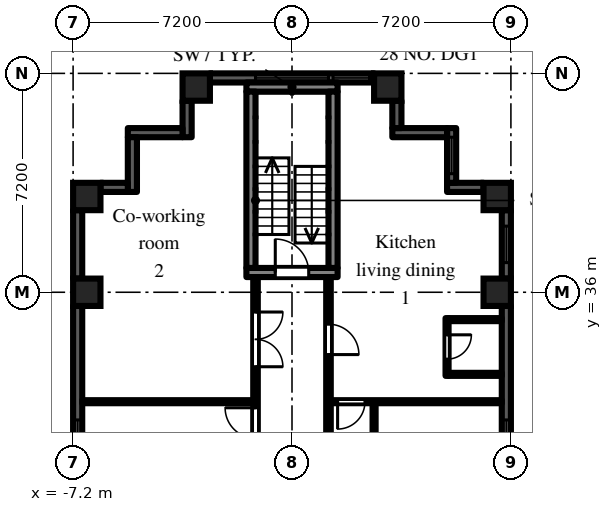
"""IFC4 building model, lengths in metres.
Left out: names, types, materials, properties, quantities, classifications, styles, units other than length and angle.
Written with IfcOpenShell. Run it as: python <this file> out.ifc"""

import sys

from ifc_helpers import new_model, si_unit, direction, frame, frame_2d, origin, origin_2d, place, context, subcontext, project, spatial, rectangle, extrude, element, fill, save


model = new_model("IFC4")
c1 = context("Model", 3, precision=1e-05, world=origin(), true_north=direction((0.0, 1.0)))
c2 = subcontext(c1, "Body", "Model", "MODEL_VIEW")
j1 = project(units=[si_unit("LENGTHUNIT", "METRE"), si_unit("PLANEANGLEUNIT", "RADIAN")], contexts=[c1])
p1 = place(None, origin())
s1 = spatial("IfcSite", under=j1, at=p1, CompositionType="ELEMENT")
p2 = place(p1, origin())
s2 = spatial("IfcBuilding", under=s1, at=p2, CompositionType="ELEMENT")
p3 = place(p2, frame((0.0, 0.0, 44.7)))
s3 = spatial("IfcBuildingStorey", under=s2, at=p3, CompositionType="ELEMENT", Elevation=44.7)
for number, where, z_axis, x_axis in (
    (1, (-6.75, 36.0, 0.0), (0.0, 0.0, 1.0), (1.0, 0.0, 0.0)),
    (2, (-6.75, 39.15, 0.0), (0.0, 0.0, 1.0), (1.0, 0.0, 0.0)),
    (3, (-3.15, 42.75, 0.0), (0.0, 0.0, 1.0), (1.0, 0.0, 0.0)),
    (4, (3.15, 42.75, 0.0), (0.0, 0.0, 1.0), (1.0, 0.0, 0.0)),
    (5, (6.75, 36.0, 0.0), (0.0, 0.0, 1.0), (1.0, 0.0, 0.0)),
    (6, (6.75, 39.15, 0.0), (0.0, 0.0, 1.0), (1.0, 0.0, 0.0)),
):
    element("IfcColumn", number, at=place(p3, frame(where, z_axis=z_axis, x_axis=x_axis)), inside=s3, PredefinedType="COLUMN", context=c2, shape_type="SweptSolid", body=[
        extrude(rectangle(XDim=0.9, YDim=0.9, at=origin_2d()), origin(), (0.0, 0.0, 1.0), 3.0),
    ])
p4 = place(p3, frame((7.05, 29.25, 0.0), z_axis=(0.0, 0.0, 1.0), x_axis=(0.0, 1.0, 0.0)))
e7 = element("IfcWall", 7, at=p4, inside=s3, PredefinedType="SOLIDWALL", context=c2, shape_type="SweptSolid", body=[
    extrude(rectangle(XDim=6.3, YDim=0.3, at=frame_2d((3.15, 0.0))), origin(), (0.0, 0.0, 1.0), 2.1),
])
p5 = place(p4, frame((0.15, 0.0, 0.2)))
e8 = element("IfcOpeningElement", 8, at=p5, cuts=e7, PredefinedType="OPENING", context=c2, shape_type="SweptSolid", body=[
    extrude(rectangle(XDim=2.4, YDim=1.85, at=frame_2d((1.2, 0.925))), frame((0.0, 0.16, 0.0), z_axis=(0.0, -1.0, 0.0), x_axis=(1.0, 0.0, 0.0)), (0.0, 0.0, 1.0), 0.32),
])
p6 = place(p3, frame((7.05, 36.45, 0.0), z_axis=(0.0, 0.0, 1.0), x_axis=(0.0, 1.0, 0.0)))
e9 = element("IfcWall", 9, at=p6, inside=s3, PredefinedType="SOLIDWALL", context=c2, shape_type="SweptSolid", body=[
    extrude(rectangle(XDim=2.25, YDim=0.3, at=frame_2d((1.125, 0.0))), origin(), (0.0, 0.0, 1.0), 2.1),
])
p7 = place(p6, frame((0.525, 0.0, 0.2)))
e10 = element("IfcOpeningElement", 10, at=p7, cuts=e9, PredefinedType="OPENING", context=c2, shape_type="SweptSolid", body=[
    extrude(rectangle(XDim=1.2, YDim=1.85, at=frame_2d((0.6, 0.925))), frame((0.0, 0.16, 0.0), z_axis=(0.0, -1.0, 0.0), x_axis=(1.0, 0.0, 0.0)), (0.0, 0.0, 1.0), 0.32),
])
p8 = place(p3, frame((6.3, 39.45, 0.0), z_axis=(0.0, 0.0, 1.0), x_axis=(-1.0, 0.0, 0.0)))
e11 = element("IfcWall", 11, at=p8, inside=s3, PredefinedType="SOLIDWALL", context=c2, shape_type="SweptSolid", body=[
    extrude(rectangle(XDim=1.2, YDim=0.3, at=frame_2d((0.6, 0.0))), origin(), (0.0, 0.0, 1.0), 2.575),
])
p9 = place(p3, frame((5.25, 39.6, 0.0), z_axis=(0.0, 0.0, 1.0), x_axis=(0.0, 1.0, 0.0)))
e12 = element("IfcWall", 12, at=p9, inside=s3, PredefinedType="SOLIDWALL", context=c2, shape_type="SweptSolid", body=[
    extrude(rectangle(XDim=1.8, YDim=0.3, at=frame_2d((0.9, 0.0))), origin(), (0.0, 0.0, 1.0), 2.575),
])
p10 = place(p9, frame((0.3, 0.0, 0.2)))
e13 = element("IfcOpeningElement", 13, at=p10, cuts=e12, PredefinedType="OPENING", context=c2, shape_type="SweptSolid", body=[
    extrude(rectangle(XDim=1.2, YDim=1.85, at=frame_2d((0.6, 0.925))), frame((0.0, 0.16, 0.0), z_axis=(0.0, -1.0, 0.0), x_axis=(1.0, 0.0, 0.0)), (0.0, 0.0, 1.0), 0.32),
])
p11 = place(p3, frame((5.1, 41.25, 0.0), z_axis=(0.0, 0.0, 1.0), x_axis=(-1.0, 0.0, 0.0)))
e14 = element("IfcWall", 14, at=p11, inside=s3, PredefinedType="SOLIDWALL", context=c2, shape_type="SweptSolid", body=[
    extrude(rectangle(XDim=1.8, YDim=0.3, at=frame_2d((0.9, 0.0))), origin(), (0.0, 0.0, 1.0), 2.575),
])
p12 = place(p3, frame((3.45, 41.4, 0.0), z_axis=(0.0, 0.0, 1.0), x_axis=(0.0, 1.0, 0.0)))
e15 = element("IfcWall", 15, at=p12, inside=s3, PredefinedType="SOLIDWALL", context=c2, shape_type="SweptSolid", body=[
    extrude(rectangle(XDim=0.9, YDim=0.3, at=frame_2d((0.45, 0.0))), origin(), (0.0, 0.0, 1.0), 2.575),
])
p13 = place(p3, frame((2.7, 43.05, 0.0), z_axis=(0.0, 0.0, 1.0), x_axis=(-1.0, 0.0, 0.0)))
e16 = element("IfcWall", 16, at=p13, inside=s3, PredefinedType="SOLIDWALL", context=c2, shape_type="SweptSolid", body=[
    extrude(rectangle(XDim=5.4, YDim=0.3, at=frame_2d((2.7, 0.0))), origin(), (0.0, 0.0, 1.0), 2.1),
])
p14 = place(p13, frame((1.5, 0.0, 0.2)))
e17 = element("IfcOpeningElement", 17, at=p14, cuts=e16, PredefinedType="OPENING", context=c2, shape_type="SweptSolid", body=[
    extrude(rectangle(XDim=2.4, YDim=1.85, at=frame_2d((1.2, 0.925))), frame((0.0, 0.16, 0.0), z_axis=(0.0, -1.0, 0.0), x_axis=(1.0, 0.0, 0.0)), (0.0, 0.0, 1.0), 0.32),
])
p15 = place(p13, frame((0.15, 0.0, 0.2)))
e18 = element("IfcOpeningElement", 18, at=p15, cuts=e16, PredefinedType="OPENING", context=c2, shape_type="SweptSolid", body=[
    extrude(rectangle(XDim=1.2, YDim=1.85, at=frame_2d((0.6, 0.925))), frame((0.0, 0.16, 0.0), z_axis=(0.0, -1.0, 0.0), x_axis=(1.0, 0.0, 0.0)), (0.0, 0.0, 1.0), 0.32),
])
p16 = place(p3, frame((-3.45, 42.3, 0.0), z_axis=(0.0, 0.0, 1.0), x_axis=(0.0, -1.0, 0.0)))
e19 = element("IfcWall", 19, at=p16, inside=s3, PredefinedType="SOLIDWALL", context=c2, shape_type="SweptSolid", body=[
    extrude(rectangle(XDim=1.2, YDim=0.3, at=frame_2d((0.6, 0.0))), origin(), (0.0, 0.0, 1.0), 2.575),
])
p17 = place(p3, frame((-3.6, 41.25, 0.0), z_axis=(0.0, 0.0, 1.0), x_axis=(-1.0, 0.0, 0.0)))
e20 = element("IfcWall", 20, at=p17, inside=s3, PredefinedType="SOLIDWALL", context=c2, shape_type="SweptSolid", body=[
    extrude(rectangle(XDim=1.8, YDim=0.3, at=frame_2d((0.9, 0.0))), origin(), (0.0, 0.0, 1.0), 2.575),
])
p18 = place(p3, frame((-5.25, 41.1, 0.0), z_axis=(0.0, 0.0, 1.0), x_axis=(0.0, -1.0, 0.0)))
e21 = element("IfcWall", 21, at=p18, inside=s3, PredefinedType="SOLIDWALL", context=c2, shape_type="SweptSolid", body=[
    extrude(rectangle(XDim=1.8, YDim=0.3, at=frame_2d((0.9, 0.0))), origin(), (0.0, 0.0, 1.0), 2.575),
])
p19 = place(p3, frame((-5.4, 39.45, 0.0), z_axis=(0.0, 0.0, 1.0), x_axis=(-1.0, 0.0, 0.0)))
e22 = element("IfcWall", 22, at=p19, inside=s3, PredefinedType="SOLIDWALL", context=c2, shape_type="SweptSolid", body=[
    extrude(rectangle(XDim=0.9, YDim=0.3, at=frame_2d((0.45, 0.0))), origin(), (0.0, 0.0, 1.0), 2.575),
])
p20 = place(p3, frame((-7.05, 38.7, 0.0), z_axis=(0.0, 0.0, 1.0), x_axis=(0.0, -1.0, 0.0)))
e23 = element("IfcWall", 23, at=p20, inside=s3, PredefinedType="SOLIDWALL", context=c2, shape_type="SweptSolid", body=[
    extrude(rectangle(XDim=2.25, YDim=0.3, at=frame_2d((1.125, 0.0))), origin(), (0.0, 0.0, 1.0), 2.1),
])
p21 = place(p3, frame((-7.05, 35.55, 0.0), z_axis=(0.0, 0.0, 1.0), x_axis=(0.0, -1.0, 0.0)))
e24 = element("IfcWall", 24, at=p21, inside=s3, PredefinedType="SOLIDWALL", context=c2, shape_type="SweptSolid", body=[
    extrude(rectangle(XDim=6.3, YDim=0.3, at=frame_2d((3.15, 0.0))), origin(), (0.0, 0.0, 1.0), 2.1),
])
p22 = place(p21, frame((3.75, 0.0, 0.2)))
e25 = element("IfcOpeningElement", 25, at=p22, cuts=e24, PredefinedType="OPENING", context=c2, shape_type="SweptSolid", body=[
    extrude(rectangle(XDim=2.4, YDim=1.85, at=frame_2d((1.2, 0.925))), frame((0.0, 0.16, 0.0), z_axis=(0.0, -1.0, 0.0), x_axis=(1.0, 0.0, 0.0)), (0.0, 0.0, 1.0), 0.32),
])
p23 = place(p3, frame((-1.5, 36.65, 0.0), z_axis=(0.0, 0.0, 1.0), x_axis=(1.0, 0.0, 0.0)))
e26 = element("IfcWall", 26, at=p23, inside=s3, PredefinedType="SHEAR", context=c2, shape_type="SweptSolid", body=[
    extrude(rectangle(XDim=3.0, YDim=0.3, at=frame_2d((1.5, 0.0))), origin(), (0.0, 0.0, 1.0), 2.575),
])
p24 = place(p23, frame((0.95, 0.0, 0.0)))
e27 = element("IfcOpeningElement", 27, at=p24, cuts=e26, PredefinedType="OPENING", context=c2, shape_type="SweptSolid", body=[
    extrude(rectangle(XDim=1.1, YDim=2.1, at=frame_2d((0.55, 1.05))), frame((0.0, 0.16, 0.0), z_axis=(0.0, -1.0, 0.0), x_axis=(1.0, 0.0, 0.0)), (0.0, 0.0, 1.0), 0.32),
])
p25 = place(p3, frame((-1.5, 42.75, 0.0), z_axis=(0.0, 0.0, 1.0), x_axis=(1.0, 0.0, 0.0)))
e28 = element("IfcWall", 28, at=p25, inside=s3, PredefinedType="SHEAR", context=c2, shape_type="SweptSolid", body=[
    extrude(rectangle(XDim=3.0, YDim=0.3, at=frame_2d((1.5, 0.0))), origin(), (0.0, 0.0, 1.0), 2.575),
])
for number, where, z_axis, x_axis in (
    (29, (-1.35, 36.8, 0.0), (0.0, 0.0, 1.0), (0.0, 1.0, 0.0)),
    (30, (1.35, 36.8, 0.0), (0.0, 0.0, 1.0), (0.0, 1.0, 0.0)),
):
    element("IfcWall", number, at=place(p3, frame(where, z_axis=z_axis, x_axis=x_axis)), inside=s3, PredefinedType="SHEAR", context=c2, shape_type="SweptSolid", body=[
        extrude(rectangle(XDim=5.8, YDim=0.3, at=frame_2d((2.9, 0.0))), origin(), (0.0, 0.0, 1.0), 2.575),
    ])
p26 = place(p3, frame((-6.9, 32.4, 0.0), z_axis=(0.0, 0.0, 1.0), x_axis=(1.0, 0.0, 0.0)))
e31 = element("IfcWall", 31, at=p26, inside=s3, PredefinedType="PARTITIONING", context=c2, shape_type="SweptSolid", body=[
    extrude(rectangle(XDim=5.625, YDim=0.1, at=frame_2d((2.812, 0.0))), origin(), (0.0, 0.0, 1.0), 2.575),
])
p27 = place(p3, frame((-1.2, 1.275, 0.0), z_axis=(0.0, 0.0, 1.0), x_axis=(0.0, 1.0, 0.0)))
e32 = element("IfcWall", 32, at=p27, inside=s3, PredefinedType="PARTITIONING", context=c2, shape_type="SweptSolid", body=[
    extrude(rectangle(XDim=35.225, YDim=0.15, at=frame_2d((17.613, 0.0))), origin(), (0.0, 0.0, 1.0), 2.575),
])
p28 = place(p27, frame((2.475, 0.0, 0.0)))
e33 = element("IfcOpeningElement", 33, at=p28, cuts=e32, PredefinedType="OPENING", context=c2, shape_type="SweptSolid", body=[
    extrude(rectangle(XDim=0.9, YDim=2.1, at=frame_2d((0.45, 1.05))), frame((0.0, 0.085, 0.0), z_axis=(0.0, -1.0, 0.0), x_axis=(1.0, 0.0, 0.0)), (0.0, 0.0, 1.0), 0.17),
])
p29 = place(p27, frame((10.875, 0.0, 0.0)))
e34 = element("IfcOpeningElement", 34, at=p29, cuts=e32, PredefinedType="OPENING", context=c2, shape_type="SweptSolid", body=[
    extrude(rectangle(XDim=0.9, YDim=2.1, at=frame_2d((0.45, 1.05))), frame((0.0, 0.085, 0.0), z_axis=(0.0, -1.0, 0.0), x_axis=(1.0, 0.0, 0.0)), (0.0, 0.0, 1.0), 0.17),
])
p30 = place(p27, frame((15.825, 0.0, 0.0)))
e35 = element("IfcOpeningElement", 35, at=p30, cuts=e32, PredefinedType="OPENING", context=c2, shape_type="SweptSolid", body=[
    extrude(rectangle(XDim=1.8, YDim=2.1, at=frame_2d((0.9, 1.05))), frame((0.0, 0.085, 0.0), z_axis=(0.0, -1.0, 0.0), x_axis=(1.0, 0.0, 0.0)), (0.0, 0.0, 1.0), 0.17),
])
p31 = place(p27, frame((22.725, 0.0, 0.0)))
e36 = element("IfcOpeningElement", 36, at=p31, cuts=e32, PredefinedType="OPENING", context=c2, shape_type="SweptSolid", body=[
    extrude(rectangle(XDim=1.0, YDim=2.1, at=frame_2d((0.5, 1.05))), frame((0.0, 0.085, 0.0), z_axis=(0.0, -1.0, 0.0), x_axis=(1.0, 0.0, 0.0)), (0.0, 0.0, 1.0), 0.17),
])
p32 = place(p27, frame((29.925, 0.0, 0.0)))
e37 = element("IfcOpeningElement", 37, at=p32, cuts=e32, PredefinedType="OPENING", context=c2, shape_type="SweptSolid", body=[
    extrude(rectangle(XDim=1.0, YDim=2.1, at=frame_2d((0.5, 1.05))), frame((0.0, 0.085, 0.0), z_axis=(0.0, -1.0, 0.0), x_axis=(1.0, 0.0, 0.0)), (0.0, 0.0, 1.0), 0.17),
])
p33 = place(p27, frame((32.275, 0.0, 0.0)))
e38 = element("IfcOpeningElement", 38, at=p33, cuts=e32, PredefinedType="OPENING", context=c2, shape_type="SweptSolid", body=[
    extrude(rectangle(XDim=1.8, YDim=2.1, at=frame_2d((0.9, 1.05))), frame((0.0, 0.085, 0.0), z_axis=(0.0, -1.0, 0.0), x_axis=(1.0, 0.0, 0.0)), (0.0, 0.0, 1.0), 0.17),
])
p34 = place(p3, frame((1.2, 1.125, 0.0), z_axis=(0.0, 0.0, 1.0), x_axis=(0.0, 1.0, 0.0)))
e39 = element("IfcWall", 39, at=p34, inside=s3, PredefinedType="PARTITIONING", context=c2, shape_type="SweptSolid", body=[
    extrude(rectangle(XDim=35.375, YDim=0.15, at=frame_2d((17.688, 0.0))), origin(), (0.0, 0.0, 1.0), 2.575),
])
p35 = place(p34, frame((3.825, 0.0, 0.0)))
e40 = element("IfcOpeningElement", 40, at=p35, cuts=e39, PredefinedType="OPENING", context=c2, shape_type="SweptSolid", body=[
    extrude(rectangle(XDim=0.9, YDim=2.1, at=frame_2d((0.45, 1.05))), frame((0.0, 0.085, 0.0), z_axis=(0.0, -1.0, 0.0), x_axis=(1.0, 0.0, 0.0)), (0.0, 0.0, 1.0), 0.17),
])
p36 = place(p34, frame((7.425, 0.0, 0.0)))
e41 = element("IfcOpeningElement", 41, at=p36, cuts=e39, PredefinedType="OPENING", context=c2, shape_type="SweptSolid", body=[
    extrude(rectangle(XDim=0.9, YDim=2.1, at=frame_2d((0.45, 1.05))), frame((0.0, 0.085, 0.0), z_axis=(0.0, -1.0, 0.0), x_axis=(1.0, 0.0, 0.0)), (0.0, 0.0, 1.0), 0.17),
])
p37 = place(p34, frame((13.725, 0.0, 0.0)))
e42 = element("IfcOpeningElement", 42, at=p37, cuts=e39, PredefinedType="OPENING", context=c2, shape_type="SweptSolid", body=[
    extrude(rectangle(XDim=0.9, YDim=2.1, at=frame_2d((0.45, 1.05))), frame((0.0, 0.085, 0.0), z_axis=(0.0, -1.0, 0.0), x_axis=(1.0, 0.0, 0.0)), (0.0, 0.0, 1.0), 0.17),
])
p38 = place(p34, frame((15.525, 0.0, 0.0)))
e43 = element("IfcOpeningElement", 43, at=p38, cuts=e39, PredefinedType="OPENING", context=c2, shape_type="SweptSolid", body=[
    extrude(rectangle(XDim=0.9, YDim=2.1, at=frame_2d((0.45, 1.05))), frame((0.0, 0.085, 0.0), z_axis=(0.0, -1.0, 0.0), x_axis=(1.0, 0.0, 0.0)), (0.0, 0.0, 1.0), 0.17),
])
p39 = place(p34, frame((32.825, 0.0, 0.0)))
e44 = element("IfcOpeningElement", 44, at=p39, cuts=e39, PredefinedType="OPENING", context=c2, shape_type="SweptSolid", body=[
    extrude(rectangle(XDim=1.0, YDim=2.1, at=frame_2d((0.5, 1.05))), frame((0.0, 0.085, 0.0), z_axis=(0.0, -1.0, 0.0), x_axis=(1.0, 0.0, 0.0)), (0.0, 0.0, 1.0), 0.17),
])
p40 = place(p3, frame((1.275, 32.4, 0.0), z_axis=(0.0, 0.0, 1.0), x_axis=(1.0, 0.0, 0.0)))
e45 = element("IfcWall", 45, at=p40, inside=s3, PredefinedType="PARTITIONING", context=c2, shape_type="SweptSolid", body=[
    extrude(rectangle(XDim=5.625, YDim=0.1, at=frame_2d((2.812, 0.0))), origin(), (0.0, 0.0, 1.0), 2.575),
])
p41 = place(p40, frame((0.225, 0.0, 0.0)))
e46 = element("IfcOpeningElement", 46, at=p41, cuts=e45, PredefinedType="OPENING", context=c2, shape_type="SweptSolid", body=[
    extrude(rectangle(XDim=0.9, YDim=2.1, at=frame_2d((0.45, 1.05))), frame((0.0, 0.06, 0.0), z_axis=(0.0, -1.0, 0.0), x_axis=(1.0, 0.0, 0.0)), (0.0, 0.0, 1.0), 0.12),
])
p42 = place(p3, frame((2.7, 18.075, 0.0), z_axis=(0.0, 0.0, 1.0), x_axis=(0.0, 1.0, 0.0)))
e47 = element("IfcWall", 47, at=p42, inside=s3, PredefinedType="PARTITIONING", context=c2, shape_type="SweptSolid", body=[
    extrude(rectangle(XDim=14.275, YDim=0.1, at=frame_2d((7.138, 0.0))), origin(), (0.0, 0.0, 1.0), 2.575),
])
p43 = place(p42, frame((3.255, 0.0, 0.0)))
e48 = element("IfcOpeningElement", 48, at=p43, cuts=e47, PredefinedType="OPENING", context=c2, shape_type="SweptSolid", body=[
    extrude(rectangle(XDim=0.9, YDim=2.1, at=frame_2d((0.45, 1.05))), frame((0.0, 0.06, 0.0), z_axis=(0.0, -1.0, 0.0), x_axis=(1.0, 0.0, 0.0)), (0.0, 0.0, 1.0), 0.12),
])
p44 = place(p42, frame((10.095, 0.0, 0.0)))
e49 = element("IfcOpeningElement", 49, at=p44, cuts=e47, PredefinedType="OPENING", context=c2, shape_type="SweptSolid", body=[
    extrude(rectangle(XDim=0.9, YDim=2.1, at=frame_2d((0.45, 1.05))), frame((0.0, 0.06, 0.0), z_axis=(0.0, -1.0, 0.0), x_axis=(1.0, 0.0, 0.0)), (0.0, 0.0, 1.0), 0.12),
])
p45 = place(p3, frame((5.1, 33.25, 0.0), z_axis=(0.0, 0.0, 1.0), x_axis=(0.0, 1.0, 0.0)))
e50 = element("IfcWall", 50, at=p45, inside=s3, PredefinedType="PARTITIONING", context=c2, shape_type="SweptSolid", body=[
    extrude(rectangle(XDim=1.9, YDim=0.1, at=frame_2d((0.95, 0.0))), origin(), (0.0, 0.0, 1.0), 2.575),
])
p46 = place(p45, frame((0.55, 0.0, 0.0)))
e51 = element("IfcOpeningElement", 51, at=p46, cuts=e50, PredefinedType="OPENING", context=c2, shape_type="SweptSolid", body=[
    extrude(rectangle(XDim=0.8, YDim=2.1, at=frame_2d((0.4, 1.05))), frame((0.0, 0.06, 0.0), z_axis=(0.0, -1.0, 0.0), x_axis=(1.0, 0.0, 0.0)), (0.0, 0.0, 1.0), 0.12),
])
for number, where, z_axis, x_axis in (
    (52, (5.15, 33.3, 0.0), (0.0, 0.0, 1.0), (1.0, 0.0, 0.0)),
    (53, (5.15, 35.1, 0.0), (0.0, 0.0, 1.0), (1.0, 0.0, 0.0)),
):
    element("IfcWall", number, at=place(p3, frame(where, z_axis=z_axis, x_axis=x_axis)), inside=s3, PredefinedType="PARTITIONING", context=c2, shape_type="SweptSolid", body=[
        extrude(rectangle(XDim=1.75, YDim=0.1, at=frame_2d((0.875, 0.0))), origin(), (0.0, 0.0, 1.0), 2.575),
    ])
p47 = place(p5, origin())
e54 = element("IfcWindow", 54, at=p47, inside=s3, PartitioningType="SINGLE_PANEL", PredefinedType="WINDOW", context=c2, shape_type="SweptSolid", body=[
    extrude(rectangle(XDim=2.4, YDim=1.85, at=frame_2d((1.2, 0.925))), frame((0.0, 0.03, 0.0), z_axis=(0.0, -1.0, 0.0), x_axis=(1.0, 0.0, 0.0)), (0.0, 0.0, 1.0), 0.06),
])
fill(e8, e54)
p48 = place(p7, origin())
e55 = element("IfcWindow", 55, at=p48, inside=s3, PartitioningType="SINGLE_PANEL", PredefinedType="WINDOW", context=c2, shape_type="SweptSolid", body=[
    extrude(rectangle(XDim=1.2, YDim=1.85, at=frame_2d((0.6, 0.925))), frame((0.0, 0.03, 0.0), z_axis=(0.0, -1.0, 0.0), x_axis=(1.0, 0.0, 0.0)), (0.0, 0.0, 1.0), 0.06),
])
fill(e10, e55)
p49 = place(p10, origin())
e56 = element("IfcWindow", 56, at=p49, inside=s3, PartitioningType="SINGLE_PANEL", PredefinedType="WINDOW", context=c2, shape_type="SweptSolid", body=[
    extrude(rectangle(XDim=1.2, YDim=1.85, at=frame_2d((0.6, 0.925))), frame((0.0, 0.03, 0.0), z_axis=(0.0, -1.0, 0.0), x_axis=(1.0, 0.0, 0.0)), (0.0, 0.0, 1.0), 0.06),
])
fill(e13, e56)
p50 = place(p14, origin())
e57 = element("IfcWindow", 57, at=p50, inside=s3, PartitioningType="SINGLE_PANEL", PredefinedType="WINDOW", context=c2, shape_type="SweptSolid", body=[
    extrude(rectangle(XDim=2.4, YDim=1.85, at=frame_2d((1.2, 0.925))), frame((0.0, 0.03, 0.0), z_axis=(0.0, -1.0, 0.0), x_axis=(1.0, 0.0, 0.0)), (0.0, 0.0, 1.0), 0.06),
])
fill(e17, e57)
p51 = place(p15, origin())
e58 = element("IfcWindow", 58, at=p51, inside=s3, PartitioningType="SINGLE_PANEL", PredefinedType="WINDOW", context=c2, shape_type="SweptSolid", body=[
    extrude(rectangle(XDim=1.2, YDim=1.85, at=frame_2d((0.6, 0.925))), frame((0.0, 0.03, 0.0), z_axis=(0.0, -1.0, 0.0), x_axis=(1.0, 0.0, 0.0)), (0.0, 0.0, 1.0), 0.06),
])
fill(e18, e58)
p52 = place(p22, origin())
e59 = element("IfcWindow", 59, at=p52, inside=s3, PartitioningType="SINGLE_PANEL", PredefinedType="WINDOW", context=c2, shape_type="SweptSolid", body=[
    extrude(rectangle(XDim=2.4, YDim=1.85, at=frame_2d((1.2, 0.925))), frame((0.0, 0.03, 0.0), z_axis=(0.0, -1.0, 0.0), x_axis=(1.0, 0.0, 0.0)), (0.0, 0.0, 1.0), 0.06),
])
fill(e25, e59)
p53 = place(p24, origin())
e60 = element("IfcDoor", 60, at=p53, inside=s3, OperationType="SINGLE_SWING_LEFT", PredefinedType="DOOR", context=c2, shape_type="SweptSolid", body=[
    extrude(rectangle(XDim=1.1, YDim=2.1, at=frame_2d((0.55, 1.05))), frame((0.0, 0.025, 0.0), z_axis=(0.0, -1.0, 0.0), x_axis=(1.0, 0.0, 0.0)), (0.0, 0.0, 1.0), 0.05),
])
fill(e27, e60)
p54 = place(p32, origin())
e61 = element("IfcDoor", 61, at=p54, inside=s3, OperationType="SINGLE_SWING_RIGHT", PredefinedType="DOOR", context=c2, shape_type="SweptSolid", body=[
    extrude(rectangle(XDim=1.0, YDim=2.1, at=frame_2d((0.5, 1.05))), frame((0.0, 0.025, 0.0), z_axis=(0.0, -1.0, 0.0), x_axis=(1.0, 0.0, 0.0)), (0.0, 0.0, 1.0), 0.05),
])
fill(e37, e61)
p55 = place(p33, frame((1.8, 0.0, 0.0), z_axis=(0.0, 0.0, 1.0), x_axis=(-1.0, 0.0, 0.0)))
e62 = element("IfcDoor", 62, at=p55, inside=s3, OperationType="DOUBLE_DOOR_DOUBLE_SWING", PredefinedType="DOOR", context=c2, shape_type="SweptSolid", body=[
    extrude(rectangle(XDim=1.8, YDim=2.1, at=frame_2d((0.9, 1.05))), frame((0.0, 0.025, 0.0), z_axis=(0.0, -1.0, 0.0), x_axis=(1.0, 0.0, 0.0)), (0.0, 0.0, 1.0), 0.05),
])
fill(e38, e62)
p56 = place(p46, frame((0.8, 0.0, 0.0), z_axis=(0.0, 0.0, 1.0), x_axis=(-1.0, 0.0, 0.0)))
e63 = element("IfcDoor", 63, at=p56, inside=s3, OperationType="SINGLE_SWING_LEFT", PredefinedType="DOOR", context=c2, shape_type="SweptSolid", body=[
    extrude(rectangle(XDim=0.8, YDim=2.1, at=frame_2d((0.4, 1.05))), frame((0.0, 0.025, 0.0), z_axis=(0.0, -1.0, 0.0), x_axis=(1.0, 0.0, 0.0)), (0.0, 0.0, 1.0), 0.05),
])
fill(e51, e63)
p57 = place(p39, frame((1.0, 0.0, 0.0), z_axis=(0.0, 0.0, 1.0), x_axis=(-1.0, 0.0, 0.0)))
e64 = element("IfcDoor", 64, at=p57, inside=s3, OperationType="SINGLE_SWING_RIGHT", PredefinedType="DOOR", context=c2, shape_type="SweptSolid", body=[
    extrude(rectangle(XDim=1.0, YDim=2.1, at=frame_2d((0.5, 1.05))), frame((0.0, 0.025, 0.0), z_axis=(0.0, -1.0, 0.0), x_axis=(1.0, 0.0, 0.0)), (0.0, 0.0, 1.0), 0.05),
])
fill(e44, e64)
p58 = place(p41, frame((0.9, 0.0, 0.0), z_axis=(0.0, 0.0, 1.0), x_axis=(-1.0, 0.0, 0.0)))
e65 = element("IfcDoor", 65, at=p58, inside=s3, OperationType="SINGLE_SWING_RIGHT", PredefinedType="DOOR", context=c2, shape_type="SweptSolid", body=[
    extrude(rectangle(XDim=0.9, YDim=2.1, at=frame_2d((0.45, 1.05))), frame((0.0, 0.025, 0.0), z_axis=(0.0, -1.0, 0.0), x_axis=(1.0, 0.0, 0.0)), (0.0, 0.0, 1.0), 0.05),
])
fill(e46, e65)
save(model, sys.argv[1])
